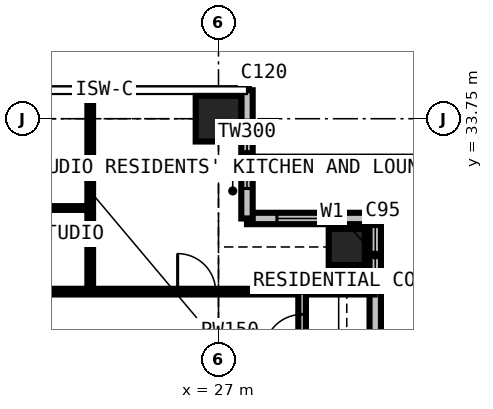
"""IFC4 building model, lengths in metres.
Left out: names, types, materials, properties, quantities, classifications, styles, units other than length and angle.
Written with IfcOpenShell. Run it as: python <this file> out.ifc"""

import sys

from ifc_helpers import new_model, si_unit, direction, frame, frame_2d, origin, origin_2d, place, context, subcontext, project, spatial, rectangle, extrude, element, fill, save


model = new_model("IFC4")
c1 = context("Model", 3, precision=1e-05, world=origin(), true_north=direction((0.0, 1.0)))
c2 = subcontext(c1, "Body", "Model", "MODEL_VIEW")
j1 = project(units=[si_unit("LENGTHUNIT", "METRE"), si_unit("PLANEANGLEUNIT", "RADIAN")], contexts=[c1])
p1 = place(None, origin())
s1 = spatial("IfcSite", under=j1, at=p1, CompositionType="ELEMENT")
p2 = place(p1, origin())
s2 = spatial("IfcBuilding", under=s1, at=p2, CompositionType="ELEMENT")
p3 = place(p2, frame((0.0, 0.0, 185.4)))
s3 = spatial("IfcBuildingStorey", under=s2, at=p3, CompositionType="ELEMENT", Elevation=185.4)
p4 = place(p3, frame((27.0, 33.75, 0.0), z_axis=(0.0, 0.0, 1.0), x_axis=(1.0, 0.0, 0.0)))
e1 = element("IfcColumn", 1, at=p4, inside=s3, PredefinedType="COLUMN", context=c2, shape_type="SweptSolid", body=[
    extrude(rectangle(XDim=1.2, YDim=1.2, at=origin_2d()), origin(), (0.0, 0.0, 1.0), 3.6),
])
p5 = place(p3, frame((30.375, 30.375, 0.0), z_axis=(0.0, 0.0, 1.0), x_axis=(1.0, 0.0, 0.0)))
e2 = element("IfcColumn", 2, at=p5, inside=s3, PredefinedType="COLUMN", context=c2, shape_type="SweptSolid", body=[
    extrude(rectangle(XDim=0.95, YDim=0.95, at=origin_2d()), origin(), (0.0, 0.0, 1.0), 3.6),
])
p6 = place(p3, frame((31.125, 27.75, 0.0), z_axis=(0.0, 0.0, 1.0), x_axis=(0.0, 1.0, 0.0)))
e3 = element("IfcWall", 3, at=p6, inside=s3, PredefinedType="SOLIDWALL", context=c2, shape_type="SweptSolid", body=[
    extrude(rectangle(XDim=3.375, YDim=0.3, at=frame_2d((1.688, 0.0))), origin(), (0.0, 0.0, 1.0), 3.375),
])
p7 = place(p6, frame((1.663, 0.0, 0.9)))
e4 = element("IfcOpeningElement", 4, at=p7, cuts=e3, PredefinedType="OPENING", context=c2, shape_type="SweptSolid", body=[
    extrude(rectangle(XDim=1.5, YDim=1.8, at=frame_2d((0.75, 0.9))), frame((0.0, 0.16, 0.0), z_axis=(0.0, -1.0, 0.0), x_axis=(1.0, 0.0, 0.0)), (0.0, 0.0, 1.0), 0.32),
])
p8 = place(p3, frame((31.125, 31.125, 0.0), z_axis=(0.0, 0.0, 1.0), x_axis=(-1.0, 0.0, 0.0)))
e5 = element("IfcWall", 5, at=p8, inside=s3, PredefinedType="SOLIDWALL", context=c2, shape_type="SweptSolid", body=[
    extrude(rectangle(XDim=3.375, YDim=0.3, at=frame_2d((1.688, 0.0))), origin(), (0.0, 0.0, 1.0), 3.375),
])
p9 = place(p8, frame((0.788, 0.0, 0.6)))
e6 = element("IfcOpeningElement", 6, at=p9, cuts=e5, PredefinedType="OPENING", context=c2, shape_type="SweptSolid", body=[
    extrude(rectangle(XDim=1.8, YDim=2.1, at=frame_2d((0.9, 1.05))), frame((0.0, 0.16, 0.0), z_axis=(0.0, -1.0, 0.0), x_axis=(1.0, 0.0, 0.0)), (0.0, 0.0, 1.0), 0.32),
])
p10 = place(p3, frame((27.75, 31.125, 0.0), z_axis=(0.0, 0.0, 1.0), x_axis=(0.0, 1.0, 0.0)))
e7 = element("IfcWall", 7, at=p10, inside=s3, PredefinedType="SOLIDWALL", context=c2, shape_type="SweptSolid", body=[
    extrude(rectangle(XDim=3.375, YDim=0.3, at=frame_2d((1.688, 0.0))), origin(), (0.0, 0.0, 1.0), 3.375),
])
p11 = place(p10, frame((0.788, 0.0, 0.6)))
e8 = element("IfcOpeningElement", 8, at=p11, cuts=e7, PredefinedType="OPENING", context=c2, shape_type="SweptSolid", body=[
    extrude(rectangle(XDim=1.8, YDim=2.1, at=frame_2d((0.9, 1.05))), frame((0.0, 0.16, 0.0), z_axis=(0.0, -1.0, 0.0), x_axis=(1.0, 0.0, 0.0)), (0.0, 0.0, 1.0), 0.32),
])
p12 = place(p3, frame((11.3, 29.2, 0.0), z_axis=(0.0, 0.0, 1.0), x_axis=(1.0, 0.0, 0.0)))
e9 = element("IfcWall", 9, at=p12, inside=s3, PredefinedType="PARTITIONING", context=c2, shape_type="SweptSolid", body=[
    extrude(rectangle(XDim=19.809, YDim=0.15, at=frame_2d((9.904, 0.0))), origin(), (0.0, 0.0, 1.0), 3.375),
])
p13 = place(p12, frame((14.625, 0.0, 0.0)))
e10 = element("IfcOpeningElement", 10, at=p13, cuts=e9, PredefinedType="OPENING", context=c2, shape_type="SweptSolid", body=[
    extrude(rectangle(XDim=1.0, YDim=2.2, at=frame_2d((0.5, 1.1))), frame((0.0, 0.085, 0.0), z_axis=(0.0, -1.0, 0.0), x_axis=(1.0, 0.0, 0.0)), (0.0, 0.0, 1.0), 0.17),
])
p14 = place(p12, frame((5.825, 0.0, 0.0)))
e11 = element("IfcOpeningElement", 11, at=p14, cuts=e9, PredefinedType="OPENING", context=c2, shape_type="SweptSolid", body=[
    extrude(rectangle(XDim=0.95, YDim=2.2, at=frame_2d((0.475, 1.1))), frame((0.0, 0.085, 0.0), z_axis=(0.0, -1.0, 0.0), x_axis=(1.0, 0.0, 0.0)), (0.0, 0.0, 1.0), 0.17),
])
p15 = place(p12, frame((9.2, 0.0, 0.0)))
e12 = element("IfcOpeningElement", 12, at=p15, cuts=e9, PredefinedType="OPENING", context=c2, shape_type="SweptSolid", body=[
    extrude(rectangle(XDim=0.95, YDim=2.2, at=frame_2d((0.475, 1.1))), frame((0.0, 0.085, 0.0), z_axis=(0.0, -1.0, 0.0), x_axis=(1.0, 0.0, 0.0)), (0.0, 0.0, 1.0), 0.17),
])
p16 = place(p12, frame((0.6, 0.0, 0.0)))
e13 = element("IfcOpeningElement", 13, at=p16, cuts=e9, PredefinedType="OPENING", context=c2, shape_type="SweptSolid", body=[
    extrude(rectangle(XDim=1.0, YDim=2.2, at=frame_2d((0.5, 1.1))), frame((0.0, 0.085, 0.0), z_axis=(0.0, -1.0, 0.0), x_axis=(1.0, 0.0, 0.0)), (0.0, 0.0, 1.0), 0.17),
])
p17 = place(p3, frame((21.625, 31.4, 0.0), z_axis=(0.0, 0.0, 1.0), x_axis=(1.0, 0.0, 0.0)))
e14 = element("IfcWall", 14, at=p17, inside=s3, PredefinedType="PARTITIONING", context=c2, shape_type="SweptSolid", body=[
    extrude(rectangle(XDim=2.0, YDim=0.1, at=frame_2d((1.0, 0.0))), origin(), (0.0, 0.0, 1.0), 3.375),
])
p18 = place(p3, frame((23.625, 29.2, 0.0), z_axis=(0.0, 0.0, 1.0), x_axis=(0.0, 1.0, 0.0)))
e15 = element("IfcWall", 15, at=p18, inside=s3, PredefinedType="PARTITIONING", context=c2, shape_type="SweptSolid", body=[
    extrude(rectangle(XDim=5.284, YDim=0.15, at=frame_2d((2.642, 0.0))), origin(), (0.0, 0.0, 1.0), 3.375),
])
p19 = place(p3, frame((29.2, 11.3, 0.0), z_axis=(0.0, 0.0, 1.0), x_axis=(0.0, 1.0, 0.0)))
e16 = element("IfcWall", 16, at=p19, inside=s3, PredefinedType="PARTITIONING", context=c2, shape_type="SweptSolid", body=[
    extrude(rectangle(XDim=17.9, YDim=0.2, at=frame_2d((8.95, 0.0))), origin(), (0.0, 0.0, 1.0), 3.375),
])
p20 = place(p19, frame((10.55, 0.0, 0.0)))
e17 = element("IfcOpeningElement", 17, at=p20, cuts=e16, PredefinedType="OPENING", context=c2, shape_type="SweptSolid", body=[
    extrude(rectangle(XDim=0.95, YDim=2.2, at=frame_2d((0.475, 1.1))), frame((0.0, 0.11, 0.0), z_axis=(0.0, -1.0, 0.0), x_axis=(1.0, 0.0, 0.0)), (0.0, 0.0, 1.0), 0.22),
])
p21 = place(p19, frame((5.775, 0.0, 0.0)))
e18 = element("IfcOpeningElement", 18, at=p21, cuts=e16, PredefinedType="OPENING", context=c2, shape_type="SweptSolid", body=[
    extrude(rectangle(XDim=0.95, YDim=2.2, at=frame_2d((0.475, 1.1))), frame((0.0, 0.11, 0.0), z_axis=(0.0, -1.0, 0.0), x_axis=(1.0, 0.0, 0.0)), (0.0, 0.0, 1.0), 0.22),
])
p22 = place(p19, frame((16.3, 0.0, 0.0)))
e19 = element("IfcOpeningElement", 19, at=p22, cuts=e16, PredefinedType="OPENING", context=c2, shape_type="SweptSolid", body=[
    extrude(rectangle(XDim=1.0, YDim=2.2, at=frame_2d((0.5, 1.1))), frame((0.0, 0.11, 0.0), z_axis=(0.0, -1.0, 0.0), x_axis=(1.0, 0.0, 0.0)), (0.0, 0.0, 1.0), 0.22),
])
p23 = place(p7, origin())
e20 = element("IfcWindow", 20, at=p23, inside=s3, PartitioningType="SINGLE_PANEL", PredefinedType="WINDOW", context=c2, shape_type="SweptSolid", body=[
    extrude(rectangle(XDim=1.5, YDim=1.8, at=frame_2d((0.75, 0.9))), frame((0.0, 0.03, 0.0), z_axis=(0.0, -1.0, 0.0), x_axis=(1.0, 0.0, 0.0)), (0.0, 0.0, 1.0), 0.06),
])
fill(e4, e20)
p24 = place(p9, origin())
e21 = element("IfcWindow", 21, at=p24, inside=s3, PartitioningType="SINGLE_PANEL", PredefinedType="WINDOW", context=c2, shape_type="SweptSolid", body=[
    extrude(rectangle(XDim=1.8, YDim=2.1, at=frame_2d((0.9, 1.05))), frame((0.0, 0.03, 0.0), z_axis=(0.0, -1.0, 0.0), x_axis=(1.0, 0.0, 0.0)), (0.0, 0.0, 1.0), 0.06),
])
fill(e6, e21)
p25 = place(p11, origin())
e22 = element("IfcWindow", 22, at=p25, inside=s3, PartitioningType="SINGLE_PANEL", PredefinedType="WINDOW", context=c2, shape_type="SweptSolid", body=[
    extrude(rectangle(XDim=1.8, YDim=2.1, at=frame_2d((0.9, 1.05))), frame((0.0, 0.03, 0.0), z_axis=(0.0, -1.0, 0.0), x_axis=(1.0, 0.0, 0.0)), (0.0, 0.0, 1.0), 0.06),
])
fill(e8, e22)
p26 = place(p22, origin())
e23 = element("IfcDoor", 23, at=p26, inside=s3, OperationType="SINGLE_SWING_LEFT", PredefinedType="DOOR", context=c2, shape_type="SweptSolid", body=[
    extrude(rectangle(XDim=1.0, YDim=2.2, at=frame_2d((0.5, 1.1))), frame((0.0, 0.025, 0.0), z_axis=(0.0, -1.0, 0.0), x_axis=(1.0, 0.0, 0.0)), (0.0, 0.0, 1.0), 0.05),
])
fill(e19, e23)
p27 = place(p13, origin())
e24 = element("IfcDoor", 24, at=p27, inside=s3, OperationType="SINGLE_SWING_LEFT", PredefinedType="DOOR", context=c2, shape_type="SweptSolid", body=[
    extrude(rectangle(XDim=1.0, YDim=2.2, at=frame_2d((0.5, 1.1))), frame((0.0, 0.025, 0.0), z_axis=(0.0, -1.0, 0.0), x_axis=(1.0, 0.0, 0.0)), (0.0, 0.0, 1.0), 0.05),
])
fill(e10, e24)
save(model, sys.argv[1])
